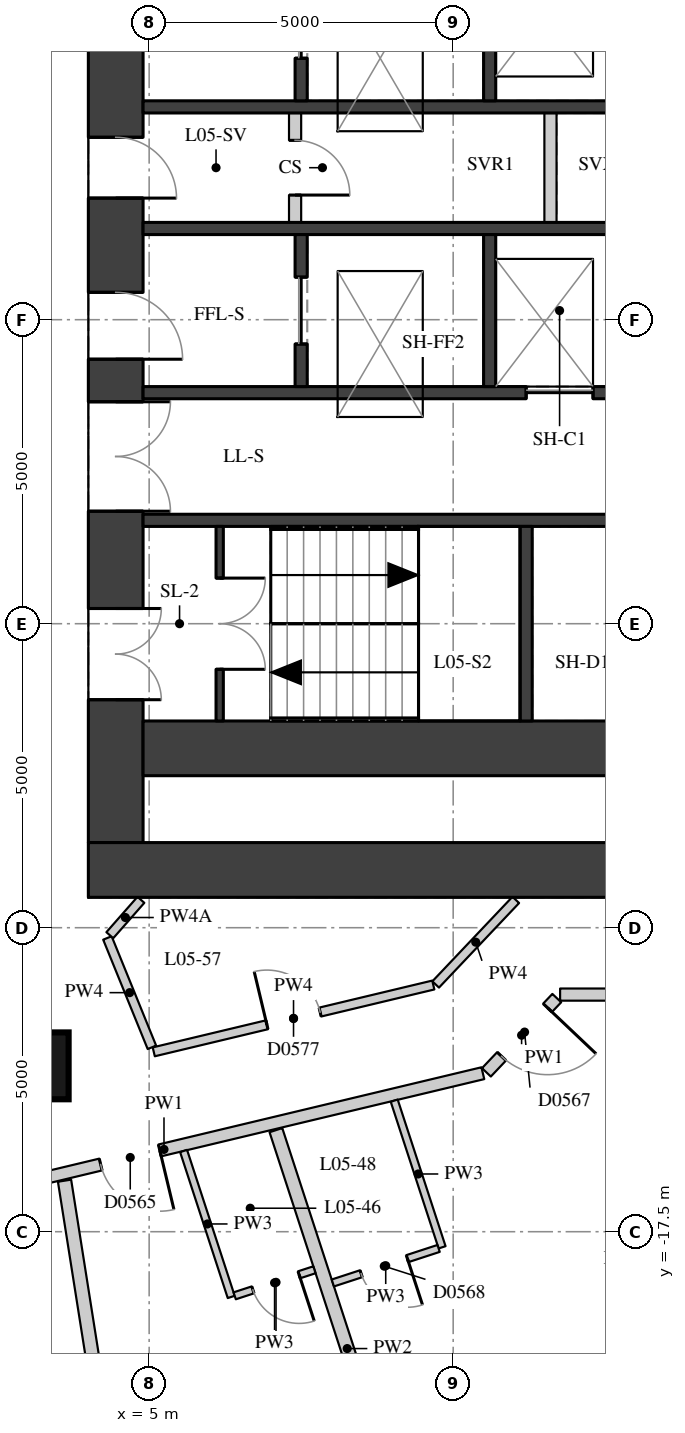
"""IFC4 building model, lengths in metres.
Left out: names, types, materials, properties, quantities, classifications, styles, units other than length and angle.
Written with IfcOpenShell. Run it as: python <this file> out.ifc"""

import sys

from ifc_helpers import new_model, si_unit, direction, frame, frame_2d, origin, origin_2d, place, context, subcontext, project, spatial, rectangle, extrude, element, fill, save


model = new_model("IFC4")
c1 = context("Model", 3, precision=1e-05, world=origin(), true_north=direction((0.0, 1.0)))
c2 = subcontext(c1, "Body", "Model", "MODEL_VIEW")
j1 = project(units=[si_unit("LENGTHUNIT", "METRE"), si_unit("PLANEANGLEUNIT", "RADIAN")], contexts=[c1])
p1 = place(None, origin())
s1 = spatial("IfcSite", under=j1, at=p1, CompositionType="ELEMENT")
p2 = place(p1, origin())
s2 = spatial("IfcBuilding", under=s1, at=p2, CompositionType="ELEMENT")
p3 = place(p2, frame((0.0, 0.0, 25.0)))
s3 = spatial("IfcBuildingStorey", under=s2, at=p3, CompositionType="ELEMENT", Elevation=25.0)
p4 = place(p3, frame((3.126, -14.772, 0.0), z_axis=(0.0, 0.0, 1.0), x_axis=(1.0, 0.0, 0.0)))
e1 = element("IfcColumn", 1, at=p4, inside=s3, PredefinedType="COLUMN", context=c2, shape_type="SweptSolid", body=[
    extrude(rectangle(XDim=1.1, YDim=1.1, at=origin_2d()), origin(), (0.0, 0.0, 1.0), 3.3),
])
p5 = place(p3, frame((4.45, -11.1, 0.0), z_axis=(0.0, 0.0, 1.0), x_axis=(0.0, 1.0, 0.0)))
e2 = element("IfcWall", 2, at=p5, inside=s3, PredefinedType="SHEAR", context=c2, shape_type="SweptSolid", body=[
    extrude(rectangle(XDim=22.2, YDim=0.9, at=frame_2d((11.1, 0.0))), origin(), (0.0, 0.0, 1.0), 3.02),
])
p6 = place(p5, frame((2.35, 0.0, 0.0)))
e3 = element("IfcOpeningElement", 3, at=p6, cuts=e2, PredefinedType="OPENING", context=c2, shape_type="SweptSolid", body=[
    extrude(rectangle(XDim=1.5, YDim=2.1, at=frame_2d((0.75, 1.05))), frame((0.0, 0.46, 0.0), z_axis=(0.0, -1.0, 0.0), x_axis=(1.0, 0.0, 0.0)), (0.0, 0.0, 1.0), 0.92),
])
p7 = place(p5, frame((5.45, 0.0, 0.0)))
e4 = element("IfcOpeningElement", 4, at=p7, cuts=e2, PredefinedType="OPENING", context=c2, shape_type="SweptSolid", body=[
    extrude(rectangle(XDim=1.8, YDim=2.1, at=frame_2d((0.9, 1.05))), frame((0.0, 0.46, 0.0), z_axis=(0.0, -1.0, 0.0), x_axis=(1.0, 0.0, 0.0)), (0.0, 0.0, 1.0), 0.92),
])
p8 = place(p5, frame((7.95, 0.0, 0.0)))
e5 = element("IfcOpeningElement", 5, at=p8, cuts=e2, PredefinedType="OPENING", context=c2, shape_type="SweptSolid", body=[
    extrude(rectangle(XDim=1.1, YDim=2.1, at=frame_2d((0.55, 1.05))), frame((0.0, 0.46, 0.0), z_axis=(0.0, -1.0, 0.0), x_axis=(1.0, 0.0, 0.0)), (0.0, 0.0, 1.0), 0.92),
])
p9 = place(p5, frame((10.6, 0.0, 0.0)))
e6 = element("IfcOpeningElement", 6, at=p9, cuts=e2, PredefinedType="OPENING", context=c2, shape_type="SweptSolid", body=[
    extrude(rectangle(XDim=1.0, YDim=2.1, at=frame_2d((0.5, 1.05))), frame((0.0, 0.46, 0.0), z_axis=(0.0, -1.0, 0.0), x_axis=(1.0, 0.0, 0.0)), (0.0, 0.0, 1.0), 0.92),
])
p10 = place(p5, frame((13.15, 0.0, 0.0)))
e7 = element("IfcOpeningElement", 7, at=p10, cuts=e2, PredefinedType="OPENING", context=c2, shape_type="SweptSolid", body=[
    extrude(rectangle(XDim=1.1, YDim=2.1, at=frame_2d((0.55, 1.05))), frame((0.0, 0.46, 0.0), z_axis=(0.0, -1.0, 0.0), x_axis=(1.0, 0.0, 0.0)), (0.0, 0.0, 1.0), 0.92),
])
p11 = place(p5, frame((14.95, 0.0, 0.0)))
e8 = element("IfcOpeningElement", 8, at=p11, cuts=e2, PredefinedType="OPENING", context=c2, shape_type="SweptSolid", body=[
    extrude(rectangle(XDim=1.8, YDim=2.1, at=frame_2d((0.9, 1.05))), frame((0.0, 0.46, 0.0), z_axis=(0.0, -1.0, 0.0), x_axis=(1.0, 0.0, 0.0)), (0.0, 0.0, 1.0), 0.92),
])
p12 = place(p5, frame((18.35, 0.0, 0.0)))
e9 = element("IfcOpeningElement", 9, at=p12, cuts=e2, PredefinedType="OPENING", context=c2, shape_type="SweptSolid", body=[
    extrude(rectangle(XDim=1.5, YDim=2.1, at=frame_2d((0.75, 1.05))), frame((0.0, 0.46, 0.0), z_axis=(0.0, -1.0, 0.0), x_axis=(1.0, 0.0, 0.0)), (0.0, 0.0, 1.0), 0.92),
])
p13 = place(p3, frame((4.0, -11.55, 0.0), z_axis=(0.0, 0.0, 1.0), x_axis=(1.0, 0.0, 0.0)))
e10 = element("IfcWall", 10, at=p13, inside=s3, PredefinedType="SHEAR", context=c2, shape_type="SweptSolid", body=[
    extrude(rectangle(XDim=15.2, YDim=0.9, at=frame_2d((7.6, 0.0))), origin(), (0.0, 0.0, 1.0), 3.02),
])
p14 = place(p3, frame((4.9, -9.55, 0.0), z_axis=(0.0, 0.0, 1.0), x_axis=(1.0, 0.0, 0.0)))
e11 = element("IfcWall", 11, at=p14, inside=s3, PredefinedType="SHEAR", context=c2, shape_type="SweptSolid", body=[
    extrude(rectangle(XDim=10.2, YDim=0.9, at=frame_2d((5.1, 0.0))), origin(), (0.0, 0.0, 1.0), 3.02),
])
for number, where, z_axis, x_axis in (
    (12, (4.9, 1.0, 0.0), (0.0, 0.0, 1.0), (1.0, 0.0, 0.0)),
    (13, (4.9, -1.0, 0.0), (0.0, 0.0, 1.0), (1.0, 0.0, 0.0)),
):
    element("IfcWall", number, at=place(p3, frame(where, z_axis=z_axis, x_axis=x_axis)), inside=s3, PredefinedType="SHEAR", context=c2, shape_type="SweptSolid", body=[
        extrude(rectangle(XDim=10.2, YDim=0.2, at=frame_2d((5.1, 0.0))), origin(), (0.0, 0.0, 1.0), 3.02),
    ])
p15 = place(p3, frame((4.9, -3.7, 0.0), z_axis=(0.0, 0.0, 1.0), x_axis=(1.0, 0.0, 0.0)))
e14 = element("IfcWall", 14, at=p15, inside=s3, PredefinedType="SHEAR", context=c2, shape_type="SweptSolid", body=[
    extrude(rectangle(XDim=10.2, YDim=0.2, at=frame_2d((5.1, 0.0))), origin(), (0.0, 0.0, 1.0), 3.02),
])
p16 = place(p15, frame((6.3, 0.0, 0.0)))
e15 = element("IfcOpeningElement", 15, at=p16, cuts=e14, PredefinedType="OPENING", context=c2, shape_type="SweptSolid", body=[
    extrude(rectangle(XDim=1.1, YDim=2.1, at=frame_2d((0.55, 1.05))), frame((0.0, 0.11, 0.0), z_axis=(0.0, -1.0, 0.0), x_axis=(1.0, 0.0, 0.0)), (0.0, 0.0, 1.0), 0.22),
])
p17 = place(p15, frame((8.6, 0.0, 0.0)))
e16 = element("IfcOpeningElement", 16, at=p17, cuts=e14, PredefinedType="OPENING", context=c2, shape_type="SweptSolid", body=[
    extrude(rectangle(XDim=1.1, YDim=2.1, at=frame_2d((0.55, 1.05))), frame((0.0, 0.11, 0.0), z_axis=(0.0, -1.0, 0.0), x_axis=(1.0, 0.0, 0.0)), (0.0, 0.0, 1.0), 0.22),
])
p18 = place(p3, frame((4.9, -5.8, 0.0), z_axis=(0.0, 0.0, 1.0), x_axis=(1.0, 0.0, 0.0)))
e17 = element("IfcWall", 17, at=p18, inside=s3, PredefinedType="SHEAR", context=c2, shape_type="SweptSolid", body=[
    extrude(rectangle(XDim=10.2, YDim=0.2, at=frame_2d((5.1, 0.0))), origin(), (0.0, 0.0, 1.0), 3.02),
])
p19 = place(p3, frame((11.2, -9.1, 0.0), z_axis=(0.0, 0.0, 1.0), x_axis=(0.0, 1.0, 0.0)))
e18 = element("IfcWall", 18, at=p19, inside=s3, PredefinedType="SHEAR", context=c2, shape_type="SweptSolid", body=[
    extrude(rectangle(XDim=3.2, YDim=0.2, at=frame_2d((1.6, 0.0))), origin(), (0.0, 0.0, 1.0), 3.02),
])
p20 = place(p3, frame((7.5, 1.1, 0.0), z_axis=(0.0, 0.0, 1.0), x_axis=(0.0, 1.0, 0.0)))
e19 = element("IfcWall", 19, at=p20, inside=s3, PredefinedType="SHEAR", context=c2, shape_type="SweptSolid", body=[
    extrude(rectangle(XDim=2.5, YDim=0.2, at=frame_2d((1.25, 0.0))), origin(), (0.0, 0.0, 1.0), 3.02),
])
p21 = place(p20, frame((0.7, 0.0, 0.0)))
e20 = element("IfcOpeningElement", 20, at=p21, cuts=e19, PredefinedType="OPENING", context=c2, shape_type="SweptSolid", body=[
    extrude(rectangle(XDim=1.1, YDim=2.1, at=frame_2d((0.55, 1.05))), frame((0.0, 0.11, 0.0), z_axis=(0.0, -1.0, 0.0), x_axis=(1.0, 0.0, 0.0)), (0.0, 0.0, 1.0), 0.22),
])
p22 = place(p3, frame((7.5, -3.6, 0.0), z_axis=(0.0, 0.0, 1.0), x_axis=(0.0, 1.0, 0.0)))
e21 = element("IfcWall", 21, at=p22, inside=s3, PredefinedType="SHEAR", context=c2, shape_type="SweptSolid", body=[
    extrude(rectangle(XDim=2.5, YDim=0.2, at=frame_2d((1.25, 0.0))), origin(), (0.0, 0.0, 1.0), 3.02),
])
p23 = place(p22, frame((0.7, 0.0, 0.0)))
e22 = element("IfcOpeningElement", 22, at=p23, cuts=e21, PredefinedType="OPENING", context=c2, shape_type="SweptSolid", body=[
    extrude(rectangle(XDim=1.1, YDim=2.1, at=frame_2d((0.55, 1.05))), frame((0.0, 0.11, 0.0), z_axis=(0.0, -1.0, 0.0), x_axis=(1.0, 0.0, 0.0)), (0.0, 0.0, 1.0), 0.22),
])
for number, where, z_axis, x_axis in (
    (23, (10.6, 1.1, 0.0), (0.0, 0.0, 1.0), (0.0, 1.0, 0.0)),
    (24, (10.6, -3.6, 0.0), (0.0, 0.0, 1.0), (0.0, 1.0, 0.0)),
):
    element("IfcWall", number, at=place(p3, frame(where, z_axis=z_axis, x_axis=x_axis)), inside=s3, PredefinedType="SHEAR", context=c2, shape_type="SweptSolid", body=[
        extrude(rectangle(XDim=2.5, YDim=0.2, at=frame_2d((1.25, 0.0))), origin(), (0.0, 0.0, 1.0), 3.02),
    ])
p24 = place(p3, frame((6.16, -9.1, 0.0), z_axis=(0.0, 0.0, 1.0), x_axis=(0.0, 1.0, 0.0)))
e25 = element("IfcWall", 25, at=p24, inside=s3, PredefinedType="SHEAR", context=c2, shape_type="SweptSolid", body=[
    extrude(rectangle(XDim=3.2, YDim=0.12, at=frame_2d((1.6, 0.0))), origin(), (0.0, 0.0, 1.0), 3.02),
])
p25 = place(p24, frame((0.85, 0.0, 0.0)))
e26 = element("IfcOpeningElement", 26, at=p25, cuts=e25, PredefinedType="OPENING", context=c2, shape_type="SweptSolid", body=[
    extrude(rectangle(XDim=1.5, YDim=2.1, at=frame_2d((0.75, 1.05))), frame((0.0, 0.07, 0.0), z_axis=(0.0, -1.0, 0.0), x_axis=(1.0, 0.0, 0.0)), (0.0, 0.0, 1.0), 0.14),
])
p26 = place(p3, frame((7.4, -0.9, 0.0), z_axis=(0.0, 0.0, 1.0), x_axis=(0.0, 1.0, 0.0)))
e27 = element("IfcWall", 27, at=p26, inside=s3, PredefinedType="PARTITIONING", context=c2, shape_type="SweptSolid", body=[
    extrude(rectangle(XDim=1.8, YDim=0.2, at=frame_2d((0.9, 0.0))), origin(), (0.0, 0.0, 1.0), 3.02),
])
p27 = place(p26, frame((0.45, 0.0, 0.0)))
e28 = element("IfcOpeningElement", 28, at=p27, cuts=e27, PredefinedType="OPENING", context=c2, shape_type="SweptSolid", body=[
    extrude(rectangle(XDim=0.9, YDim=2.1, at=frame_2d((0.45, 1.05))), frame((0.0, 0.11, 0.0), z_axis=(0.0, -1.0, 0.0), x_axis=(1.0, 0.0, 0.0)), (0.0, 0.0, 1.0), 0.22),
])
p28 = place(p3, frame((11.6, -0.9, 0.0), z_axis=(0.0, 0.0, 1.0), x_axis=(0.0, 1.0, 0.0)))
e29 = element("IfcWall", 29, at=p28, inside=s3, PredefinedType="PARTITIONING", context=c2, shape_type="SweptSolid", body=[
    extrude(rectangle(XDim=1.8, YDim=0.2, at=frame_2d((0.9, 0.0))), origin(), (0.0, 0.0, 1.0), 3.02),
])
p29 = place(p3, frame((20.7, -13.6, 0.0), z_axis=(0.0, 0.0, 1.0), x_axis=(-1.0, 0.0, 0.0)))
e30 = element("IfcWall", 30, at=p29, inside=s3, PredefinedType="PARTITIONING", context=c2, shape_type="SweptSolid", body=[
    extrude(rectangle(XDim=8.941, YDim=0.2, at=frame_2d((4.471, 0.0))), origin(), (0.0, 0.0, 1.0), 3.02),
])
p30 = place(p29, frame((2.436, 0.0, 0.0)))
e31 = element("IfcOpeningElement", 31, at=p30, cuts=e30, PredefinedType="OPENING", context=c2, shape_type="SweptSolid", body=[
    extrude(rectangle(XDim=1.8, YDim=2.1, at=frame_2d((0.9, 1.05))), frame((0.0, 0.11, 0.0), z_axis=(0.0, -1.0, 0.0), x_axis=(1.0, 0.0, 0.0)), (0.0, 0.0, 1.0), 0.22),
])
p31 = place(p3, frame((11.704, -13.658, 0.0), z_axis=(0.0, 0.0, 1.0), x_axis=(-0.687768795377, -0.725929806597, 0.0)))
e32 = element("IfcWall", 32, at=p31, inside=s3, PredefinedType="PARTITIONING", context=c2, shape_type="SweptSolid", body=[
    extrude(rectangle(XDim=1.683, YDim=0.2, at=frame_2d((0.841, 0.0))), origin(), (0.0, 0.0, 1.0), 3.02),
])
p32 = place(p31, frame((0.22, 0.0, 0.0)))
e33 = element("IfcOpeningElement", 33, at=p32, cuts=e32, PredefinedType="OPENING", context=c2, shape_type="SweptSolid", body=[
    extrude(rectangle(XDim=1.1, YDim=2.1, at=frame_2d((0.55, 1.05))), frame((0.0, 0.11, 0.0), z_axis=(0.0, -1.0, 0.0), x_axis=(1.0, 0.0, 0.0)), (0.0, 0.0, 1.0), 0.22),
])
p33 = place(p3, frame((10.488, -14.893, 0.0), z_axis=(0.0, 0.0, 1.0), x_axis=(-0.972603489924, -0.23247032367, 0.0)))
e34 = element("IfcWall", 34, at=p33, inside=s3, PredefinedType="PARTITIONING", context=c2, shape_type="SweptSolid", body=[
    extrude(rectangle(XDim=10.783, YDim=0.2, at=frame_2d((5.392, 0.0))), origin(), (0.0, 0.0, 1.0), 3.02),
])
p34 = place(p33, frame((8.59, 0.0, 0.0)))
e35 = element("IfcOpeningElement", 35, at=p34, cuts=e34, PredefinedType="OPENING", context=c2, shape_type="SweptSolid", body=[
    extrude(rectangle(XDim=0.9, YDim=2.1, at=frame_2d((0.45, 1.05))), frame((0.0, 0.11, 0.0), z_axis=(0.0, -1.0, 0.0), x_axis=(1.0, 0.0, 0.0)), (0.0, 0.0, 1.0), 0.22),
])
p35 = place(p33, frame((5.462, 0.0, 0.0)))
e36 = element("IfcOpeningElement", 36, at=p35, cuts=e34, PredefinedType="OPENING", context=c2, shape_type="SweptSolid", body=[
    extrude(rectangle(XDim=1.0, YDim=2.1, at=frame_2d((0.5, 1.05))), frame((0.0, 0.11, 0.0), z_axis=(0.0, -1.0, 0.0), x_axis=(1.0, 0.0, 0.0)), (0.0, 0.0, 1.0), 0.22),
])
p36 = place(p3, frame((11.03, -12.043, 0.0), z_axis=(0.0, 0.0, 1.0), x_axis=(-0.687734044261, -0.725962729322, 0.0)))
e37 = element("IfcWall", 37, at=p36, inside=s3, PredefinedType="PARTITIONING", context=c2, shape_type="SweptSolid", body=[
    extrude(rectangle(XDim=1.916, YDim=0.15, at=frame_2d((0.958, 0.0))), origin(), (0.0, 0.0, 1.0), 3.02),
])
p37 = place(p3, frame((9.673, -13.443, 0.0), z_axis=(0.0, 0.0, 1.0), x_axis=(-0.972603013932, -0.232472315103, 0.0)))
e38 = element("IfcWall", 38, at=p37, inside=s3, PredefinedType="PARTITIONING", context=c2, shape_type="SweptSolid", body=[
    extrude(rectangle(XDim=4.727, YDim=0.15, at=frame_2d((2.363, 0.0))), origin(), (0.0, 0.0, 1.0), 3.02),
])
p38 = place(p37, frame((1.914, 0.0, 0.0)))
e39 = element("IfcOpeningElement", 39, at=p38, cuts=e38, PredefinedType="OPENING", context=c2, shape_type="SweptSolid", body=[
    extrude(rectangle(XDim=0.9, YDim=2.1, at=frame_2d((0.45, 1.05))), frame((0.0, 0.085, 0.0), z_axis=(0.0, -1.0, 0.0), x_axis=(1.0, 0.0, 0.0)), (0.0, 0.0, 1.0), 0.17),
])
p39 = place(p3, frame((5.045, -14.468, 0.0), z_axis=(0.0, 0.0, 1.0), x_axis=(-0.376889538578, 0.926258212223, 0.0)))
e40 = element("IfcWall", 40, at=p39, inside=s3, PredefinedType="PARTITIONING", context=c2, shape_type="SweptSolid", body=[
    extrude(rectangle(XDim=1.942, YDim=0.15, at=frame_2d((0.971, 0.0))), origin(), (0.0, 0.0, 1.0), 3.02),
])
p40 = place(p3, frame((4.353, -12.623, 0.0), z_axis=(0.0, 0.0, 1.0), x_axis=(0.660265480509, 0.751032286422, 0.0)))
e41 = element("IfcWall", 41, at=p40, inside=s3, PredefinedType="PARTITIONING", context=c2, shape_type="SweptSolid", body=[
    extrude(rectangle(XDim=0.775, YDim=0.15, at=frame_2d((0.387, 0.0))), origin(), (0.0, 0.0, 1.0), 2.57),
])
p41 = place(p3, frame((4.788, -24.125, 0.0), z_axis=(0.0, 0.0, 1.0), x_axis=(-0.156131781396, 0.987736233434, 0.0)))
e42 = element("IfcWall", 42, at=p41, inside=s3, PredefinedType="PARTITIONING", context=c2, shape_type="SweptSolid", body=[
    extrude(rectangle(XDim=7.557, YDim=0.22, at=frame_2d((3.779, 0.0))), origin(), (0.0, 0.0, 1.0), 2.47),
])
p42 = place(p3, frame((9.429, -23.014, 0.0), z_axis=(0.0, 0.0, 1.0), x_axis=(-0.310261176215, 0.950651356983, 0.0)))
e43 = element("IfcWall", 43, at=p42, inside=s3, PredefinedType="PARTITIONING", context=c2, shape_type="SweptSolid", body=[
    extrude(rectangle(XDim=7.557, YDim=0.22, at=frame_2d((3.779, 0.0))), origin(), (0.0, 0.0, 1.0), 3.02),
])
p43 = place(p3, frame((5.566, -16.172, 0.0), z_axis=(0.0, 0.0, 1.0), x_axis=(0.310159281599, -0.950684605975, 0.0)))
e44 = element("IfcWall", 44, at=p43, inside=s3, PredefinedType="PARTITIONING", context=c2, shape_type="SweptSolid", body=[
    extrude(rectangle(XDim=2.525, YDim=0.12, at=frame_2d((1.263, 0.0))), origin(), (0.0, 0.0, 1.0), 3.02),
])
p44 = place(p3, frame((9.03, -15.344, 0.0), z_axis=(0.0, 0.0, 1.0), x_axis=(0.310275804943, -0.950646582525, 0.0)))
e45 = element("IfcWall", 45, at=p44, inside=s3, PredefinedType="PARTITIONING", context=c2, shape_type="SweptSolid", body=[
    extrude(rectangle(XDim=2.538, YDim=0.12, at=frame_2d((1.269, 0.0))), origin(), (0.0, 0.0, 1.0), 3.02),
])
p45 = place(p3, frame((6.407, -18.554, 0.0), z_axis=(0.0, 0.0, 1.0), x_axis=(0.950628893115, 0.310329997864, 0.0)))
e46 = element("IfcWall", 46, at=p45, inside=s3, PredefinedType="PARTITIONING", context=c2, shape_type="SweptSolid", body=[
    extrude(rectangle(XDim=1.38, YDim=0.12, at=frame_2d((0.69, 0.0))), origin(), (0.0, 0.0, 1.0), 3.02),
])
p46 = place(p45, frame((0.315, 0.0, 0.0)))
e47 = element("IfcOpeningElement", 47, at=p46, cuts=e46, PredefinedType="OPENING", context=c2, shape_type="SweptSolid", body=[
    extrude(rectangle(XDim=0.8, YDim=2.1, at=frame_2d((0.4, 1.05))), frame((0.0, 0.07, 0.0), z_axis=(0.0, -1.0, 0.0), x_axis=(1.0, 0.0, 0.0)), (0.0, 0.0, 1.0), 0.14),
])
p47 = place(p3, frame((9.76, -17.775, 0.0), z_axis=(0.0, 0.0, 1.0), x_axis=(-0.950599833202, -0.310419002506, 0.0)))
e48 = element("IfcWall", 48, at=p47, inside=s3, PredefinedType="PARTITIONING", context=c2, shape_type="SweptSolid", body=[
    extrude(rectangle(XDim=1.83, YDim=0.12, at=frame_2d((0.915, 0.0))), origin(), (0.0, 0.0, 1.0), 3.02),
])
p48 = place(p47, frame((0.54, 0.0, 0.0)))
e49 = element("IfcOpeningElement", 49, at=p48, cuts=e48, PredefinedType="OPENING", context=c2, shape_type="SweptSolid", body=[
    extrude(rectangle(XDim=0.8, YDim=2.1, at=frame_2d((0.4, 1.05))), frame((0.0, 0.07, 0.0), z_axis=(0.0, -1.0, 0.0), x_axis=(1.0, 0.0, 0.0)), (0.0, 0.0, 1.0), 0.14),
])
p49 = place(p6, origin())
e50 = element("IfcDoor", 50, at=p49, inside=s3, OperationType="DOUBLE_DOOR_SINGLE_SWING", PredefinedType="DOOR", context=c2, shape_type="SweptSolid", body=[
    extrude(rectangle(XDim=1.5, YDim=2.1, at=frame_2d((0.75, 1.05))), frame((0.0, 0.025, 0.0), z_axis=(0.0, -1.0, 0.0), x_axis=(1.0, 0.0, 0.0)), (0.0, 0.0, 1.0), 0.05),
])
fill(e3, e50)
p50 = place(p7, origin())
e51 = element("IfcDoor", 51, at=p50, inside=s3, OperationType="DOUBLE_DOOR_SINGLE_SWING", PredefinedType="DOOR", context=c2, shape_type="SweptSolid", body=[
    extrude(rectangle(XDim=1.8, YDim=2.1, at=frame_2d((0.9, 1.05))), frame((0.0, 0.025, 0.0), z_axis=(0.0, -1.0, 0.0), x_axis=(1.0, 0.0, 0.0)), (0.0, 0.0, 1.0), 0.05),
])
fill(e4, e51)
p51 = place(p8, origin())
e52 = element("IfcDoor", 52, at=p51, inside=s3, OperationType="SINGLE_SWING_RIGHT", PredefinedType="DOOR", context=c2, shape_type="SweptSolid", body=[
    extrude(rectangle(XDim=1.1, YDim=2.1, at=frame_2d((0.55, 1.05))), frame((0.0, 0.025, 0.0), z_axis=(0.0, -1.0, 0.0), x_axis=(1.0, 0.0, 0.0)), (0.0, 0.0, 1.0), 0.05),
])
fill(e5, e52)
p52 = place(p9, origin())
e53 = element("IfcDoor", 53, at=p52, inside=s3, OperationType="SINGLE_SWING_RIGHT", PredefinedType="DOOR", context=c2, shape_type="SweptSolid", body=[
    extrude(rectangle(XDim=1.0, YDim=2.1, at=frame_2d((0.5, 1.05))), frame((0.0, 0.025, 0.0), z_axis=(0.0, -1.0, 0.0), x_axis=(1.0, 0.0, 0.0)), (0.0, 0.0, 1.0), 0.05),
])
fill(e6, e53)
p53 = place(p25, origin())
e54 = element("IfcDoor", 54, at=p53, inside=s3, OperationType="DOUBLE_DOOR_SINGLE_SWING", PredefinedType="DOOR", context=c2, shape_type="SweptSolid", body=[
    extrude(rectangle(XDim=1.5, YDim=2.1, at=frame_2d((0.75, 1.05))), frame((0.0, 0.025, 0.0), z_axis=(0.0, -1.0, 0.0), x_axis=(1.0, 0.0, 0.0)), (0.0, 0.0, 1.0), 0.05),
])
fill(e26, e54)
p54 = place(p16, origin())
e55 = element("IfcDoor", 55, at=p54, inside=s3, OperationType="DOUBLE_DOOR_SLIDING", PredefinedType="DOOR", context=c2, shape_type="SweptSolid", body=[
    extrude(rectangle(XDim=1.1, YDim=2.1, at=frame_2d((0.55, 1.05))), frame((0.0, 0.025, 0.0), z_axis=(0.0, -1.0, 0.0), x_axis=(1.0, 0.0, 0.0)), (0.0, 0.0, 1.0), 0.05),
])
fill(e15, e55)
p55 = place(p21, origin())
e56 = element("IfcDoor", 56, at=p55, inside=s3, OperationType="DOUBLE_DOOR_SLIDING", PredefinedType="DOOR", context=c2, shape_type="SweptSolid", body=[
    extrude(rectangle(XDim=1.1, YDim=2.1, at=frame_2d((0.55, 1.05))), frame((0.0, 0.025, 0.0), z_axis=(0.0, -1.0, 0.0), x_axis=(1.0, 0.0, 0.0)), (0.0, 0.0, 1.0), 0.05),
])
fill(e20, e56)
p56 = place(p23, origin())
e57 = element("IfcDoor", 57, at=p56, inside=s3, OperationType="DOUBLE_DOOR_SLIDING", PredefinedType="DOOR", context=c2, shape_type="SweptSolid", body=[
    extrude(rectangle(XDim=1.1, YDim=2.1, at=frame_2d((0.55, 1.05))), frame((0.0, 0.025, 0.0), z_axis=(0.0, -1.0, 0.0), x_axis=(1.0, 0.0, 0.0)), (0.0, 0.0, 1.0), 0.05),
])
fill(e22, e57)
p57 = place(p27, origin())
e58 = element("IfcDoor", 58, at=p57, inside=s3, OperationType="SINGLE_SWING_RIGHT", PredefinedType="DOOR", context=c2, shape_type="SweptSolid", body=[
    extrude(rectangle(XDim=0.9, YDim=2.1, at=frame_2d((0.45, 1.05))), frame((0.0, 0.025, 0.0), z_axis=(0.0, -1.0, 0.0), x_axis=(1.0, 0.0, 0.0)), (0.0, 0.0, 1.0), 0.05),
])
fill(e28, e58)
p58 = place(p35, origin())
e59 = element("IfcDoor", 59, at=p58, inside=s3, OperationType="SINGLE_SWING_LEFT", PredefinedType="DOOR", context=c2, shape_type="SweptSolid", body=[
    extrude(rectangle(XDim=1.0, YDim=2.1, at=frame_2d((0.5, 1.05))), frame((0.0, 0.025, 0.0), z_axis=(0.0, -1.0, 0.0), x_axis=(1.0, 0.0, 0.0)), (0.0, 0.0, 1.0), 0.05),
])
fill(e36, e59)
p59 = place(p46, origin())
e60 = element("IfcDoor", 60, at=p59, inside=s3, OperationType="SINGLE_SWING_LEFT", PredefinedType="DOOR", context=c2, shape_type="SweptSolid", body=[
    extrude(rectangle(XDim=0.8, YDim=2.1, at=frame_2d((0.4, 1.05))), frame((0.0, 0.025, 0.0), z_axis=(0.0, -1.0, 0.0), x_axis=(1.0, 0.0, 0.0)), (0.0, 0.0, 1.0), 0.05),
])
fill(e47, e60)
p60 = place(p32, origin())
e61 = element("IfcDoor", 61, at=p60, inside=s3, OperationType="SINGLE_SWING_LEFT", PredefinedType="DOOR", context=c2, shape_type="SweptSolid", body=[
    extrude(rectangle(XDim=1.1, YDim=2.1, at=frame_2d((0.55, 1.05))), frame((0.0, 0.025, 0.0), z_axis=(0.0, -1.0, 0.0), x_axis=(1.0, 0.0, 0.0)), (0.0, 0.0, 1.0), 0.05),
])
fill(e33, e61)
p61 = place(p48, origin())
e62 = element("IfcDoor", 62, at=p61, inside=s3, OperationType="SINGLE_SWING_LEFT", PredefinedType="DOOR", context=c2, shape_type="SweptSolid", body=[
    extrude(rectangle(XDim=0.8, YDim=2.1, at=frame_2d((0.4, 1.05))), frame((0.0, 0.025, 0.0), z_axis=(0.0, -1.0, 0.0), x_axis=(1.0, 0.0, 0.0)), (0.0, 0.0, 1.0), 0.05),
])
fill(e49, e62)
p62 = place(p38, origin())
e63 = element("IfcDoor", 63, at=p62, inside=s3, OperationType="SINGLE_SWING_LEFT", PredefinedType="DOOR", context=c2, shape_type="SweptSolid", body=[
    extrude(rectangle(XDim=0.9, YDim=2.1, at=frame_2d((0.45, 1.05))), frame((0.0, 0.025, 0.0), z_axis=(0.0, -1.0, 0.0), x_axis=(1.0, 0.0, 0.0)), (0.0, 0.0, 1.0), 0.05),
])
fill(e39, e63)
save(model, sys.argv[1])
